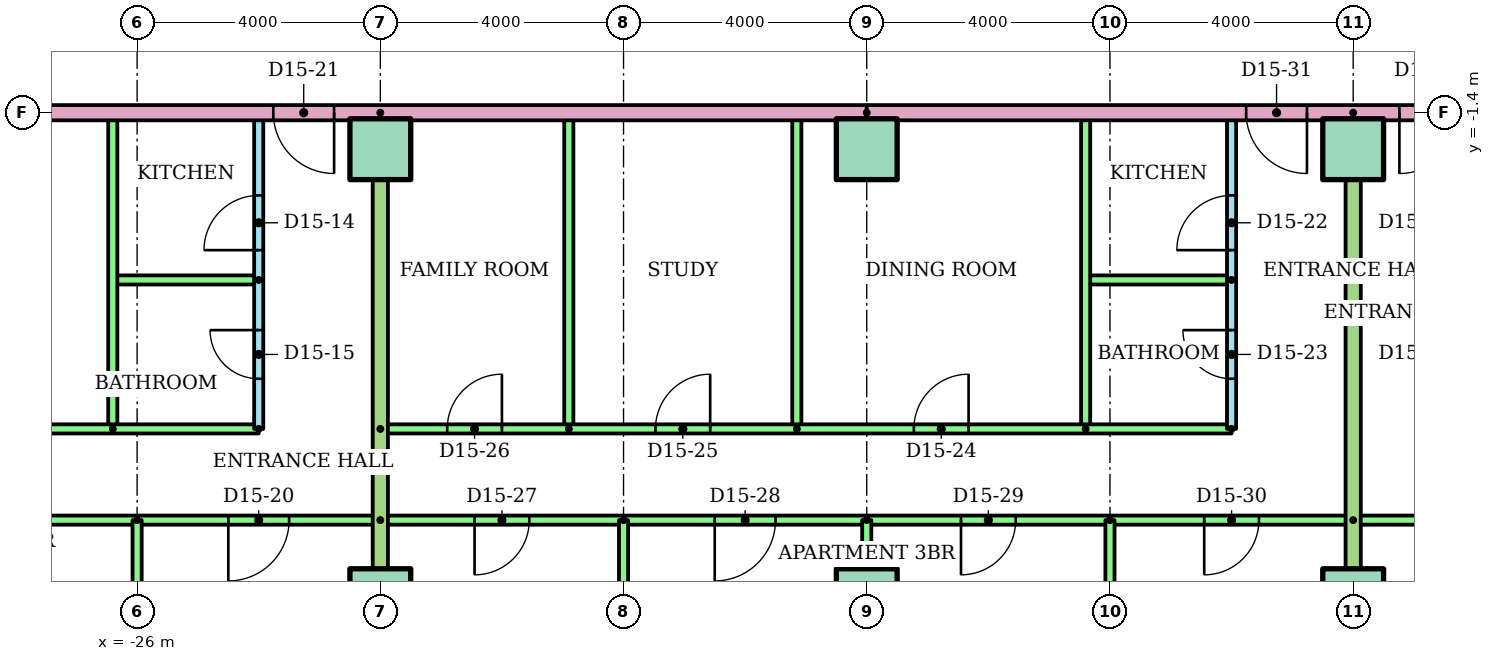
"""IFC4 building model, lengths in metres.
Left out: names, types, materials, properties, quantities, classifications, styles, units other than length and angle.
Written with IfcOpenShell. Run it as: python <this file> out.ifc"""

import sys

from ifc_helpers import new_model, si_unit, direction, frame, frame_2d, origin, origin_2d, place, context, subcontext, project, spatial, rectangle, extrude, element, fill, save


model = new_model("IFC4")
c1 = context("Model", 3, precision=1e-05, world=origin(), true_north=direction((0.0, 1.0)))
c2 = subcontext(c1, "Body", "Model", "MODEL_VIEW")
j1 = project(units=[si_unit("LENGTHUNIT", "METRE"), si_unit("PLANEANGLEUNIT", "RADIAN")], contexts=[c1])
p1 = place(None, origin())
s1 = spatial("IfcSite", under=j1, at=p1, CompositionType="ELEMENT")
p2 = place(p1, origin())
s2 = spatial("IfcBuilding", under=s1, at=p2, CompositionType="ELEMENT")
p3 = place(p2, frame((0.0, 0.0, 57.6)))
s3 = spatial("IfcBuildingStorey", under=s2, at=p3, CompositionType="ELEMENT", Elevation=57.6)
for number, where in (
    (1, (-22.0, -9.4, 0.0)),
    (2, (-14.0, -9.4, 0.0)),
    (3, (-6.0, -9.4, 0.0)),
    (4, (-22.0, -2.0, 0.0)),
    (5, (-14.0, -2.0, 0.0)),
    (6, (-6.0, -2.0, 0.0)),
):
    element("IfcColumn", number, at=place(p3, frame(where)), inside=s3, PredefinedType="COLUMN", context=c2, shape_type="SweptSolid", body=[
        extrude(rectangle(XDim=1.0, YDim=1.0, at=origin_2d()), origin(), (0.0, 0.0, 1.0), 3.2),
    ])
p4 = place(p3, frame((-24.0, -6.6, 0.0), z_axis=(0.0, 0.0, 1.0), x_axis=(0.0, 1.0, 0.0)))
e7 = element("IfcWall", 7, at=p4, inside=s3, PredefinedType="PARTITIONING", context=c2, shape_type="SweptSolid", body=[
    extrude(rectangle(XDim=5.2, YDim=0.15, at=frame_2d((2.6, 0.0))), origin(), (0.0, 0.0, 1.0), 2.4),
])
p5 = place(p4, frame((2.94, 0.0, 0.0)))
e8 = element("IfcOpeningElement", 8, at=p5, cuts=e7, PredefinedType="OPENING", context=c2, shape_type="SweptSolid", body=[
    extrude(rectangle(XDim=0.9, YDim=2.1, at=frame_2d((0.45, 1.05))), frame((0.0, 0.085, 0.0), z_axis=(0.0, -1.0, 0.0), x_axis=(1.0, 0.0, 0.0)), (0.0, 0.0, 1.0), 0.17),
])
p6 = place(p4, frame((0.825, 0.0, 0.0)))
e9 = element("IfcOpeningElement", 9, at=p6, cuts=e7, PredefinedType="OPENING", context=c2, shape_type="SweptSolid", body=[
    extrude(rectangle(XDim=0.8, YDim=2.1, at=frame_2d((0.4, 1.05))), frame((0.0, 0.085, 0.0), z_axis=(0.0, -1.0, 0.0), x_axis=(1.0, 0.0, 0.0)), (0.0, 0.0, 1.0), 0.17),
])
p7 = place(p3, frame((-24.0, -4.15, 0.0), z_axis=(0.0, 0.0, 1.0), x_axis=(-1.0, 0.0, 0.0)))
e10 = element("IfcWall", 10, at=p7, inside=s3, PredefinedType="PARTITIONING", context=c2, shape_type="SweptSolid", body=[
    extrude(rectangle(XDim=2.4, YDim=0.15, at=frame_2d((1.2, 0.0))), origin(), (0.0, 0.0, 1.0), 2.4),
])
p8 = place(p3, frame((-26.4, -6.6, 0.0), z_axis=(0.0, 0.0, 1.0), x_axis=(0.0, 1.0, 0.0)))
e11 = element("IfcWall", 11, at=p8, inside=s3, PredefinedType="PARTITIONING", context=c2, shape_type="SweptSolid", body=[
    extrude(rectangle(XDim=5.2, YDim=0.15, at=frame_2d((2.6, 0.0))), origin(), (0.0, 0.0, 1.0), 2.4),
])
p9 = place(p3, frame((-36.51, -6.6, 0.0)))
e12 = element("IfcWall", 12, at=p9, inside=s3, PredefinedType="PARTITIONING", context=c2, shape_type="SweptSolid", body=[
    extrude(rectangle(XDim=12.51, YDim=0.15, at=frame_2d((6.255, 0.0))), origin(), (0.0, 0.0, 1.0), 2.4),
])
p10 = place(p9, frame((6.785, 0.0, 0.0)))
e13 = element("IfcOpeningElement", 13, at=p10, cuts=e12, PredefinedType="OPENING", context=c2, shape_type="SweptSolid", body=[
    extrude(rectangle(XDim=0.9, YDim=2.1, at=frame_2d((0.45, 1.05))), frame((0.0, 0.085, 0.0), z_axis=(0.0, -1.0, 0.0), x_axis=(1.0, 0.0, 0.0)), (0.0, 0.0, 1.0), 0.17),
])
p11 = place(p9, frame((1.835, 0.0, 0.0)))
e14 = element("IfcOpeningElement", 14, at=p11, cuts=e12, PredefinedType="OPENING", context=c2, shape_type="SweptSolid", body=[
    extrude(rectangle(XDim=0.9, YDim=2.1, at=frame_2d((0.45, 1.05))), frame((0.0, 0.085, 0.0), z_axis=(0.0, -1.0, 0.0), x_axis=(1.0, 0.0, 0.0)), (0.0, 0.0, 1.0), 0.17),
])
p12 = place(p3, frame((-22.0, -8.1, 0.0), z_axis=(0.0, 0.0, 1.0), x_axis=(-1.0, 0.0, 0.0)))
e15 = element("IfcWall", 15, at=p12, inside=s3, PredefinedType="PARTITIONING", context=c2, shape_type="SweptSolid", body=[
    extrude(rectangle(XDim=14.51, YDim=0.15, at=frame_2d((7.255, 0.0))), origin(), (0.0, 0.0, 1.0), 2.4),
])
p13 = place(p12, frame((11.6, 0.0, 0.0)))
e16 = element("IfcOpeningElement", 16, at=p13, cuts=e15, PredefinedType="OPENING", context=c2, shape_type="SweptSolid", body=[
    extrude(rectangle(XDim=0.9, YDim=2.1, at=frame_2d((0.45, 1.05))), frame((0.0, 0.085, 0.0), z_axis=(0.0, -1.0, 0.0), x_axis=(1.0, 0.0, 0.0)), (0.0, 0.0, 1.0), 0.17),
])
p14 = place(p12, frame((6.34, 0.0, 0.0)))
e17 = element("IfcOpeningElement", 17, at=p14, cuts=e15, PredefinedType="OPENING", context=c2, shape_type="SweptSolid", body=[
    extrude(rectangle(XDim=0.9, YDim=2.1, at=frame_2d((0.45, 1.05))), frame((0.0, 0.085, 0.0), z_axis=(0.0, -1.0, 0.0), x_axis=(1.0, 0.0, 0.0)), (0.0, 0.0, 1.0), 0.17),
])
p15 = place(p12, frame((1.5, 0.0, 0.0)))
e18 = element("IfcOpeningElement", 18, at=p15, cuts=e15, PredefinedType="OPENING", context=c2, shape_type="SweptSolid", body=[
    extrude(rectangle(XDim=1.0, YDim=2.1, at=frame_2d((0.5, 1.05))), frame((0.0, 0.085, 0.0), z_axis=(0.0, -1.0, 0.0), x_axis=(1.0, 0.0, 0.0)), (0.0, 0.0, 1.0), 0.17),
])
p16 = place(p3, frame((-26.0, -8.1, 0.0), z_axis=(0.0, 0.0, 1.0), x_axis=(0.0, -1.0, 0.0)))
e19 = element("IfcWall", 19, at=p16, inside=s3, PredefinedType="PARTITIONING", context=c2, shape_type="SweptSolid", body=[
    extrude(rectangle(XDim=8.021, YDim=0.15, at=frame_2d((4.01, 0.0))), origin(), (0.0, 0.0, 1.0), 2.4),
])
p17 = place(p3, frame((-8.0, -6.6, 0.0), z_axis=(0.0, 0.0, 1.0), x_axis=(0.0, 1.0, 0.0)))
e20 = element("IfcWall", 20, at=p17, inside=s3, PredefinedType="PARTITIONING", context=c2, shape_type="SweptSolid", body=[
    extrude(rectangle(XDim=5.2, YDim=0.15, at=frame_2d((2.6, 0.0))), origin(), (0.0, 0.0, 1.0), 2.4),
])
p18 = place(p17, frame((2.94, 0.0, 0.0)))
e21 = element("IfcOpeningElement", 21, at=p18, cuts=e20, PredefinedType="OPENING", context=c2, shape_type="SweptSolid", body=[
    extrude(rectangle(XDim=0.9, YDim=2.1, at=frame_2d((0.45, 1.05))), frame((0.0, 0.085, 0.0), z_axis=(0.0, -1.0, 0.0), x_axis=(1.0, 0.0, 0.0)), (0.0, 0.0, 1.0), 0.17),
])
p19 = place(p17, frame((0.825, 0.0, 0.0)))
e22 = element("IfcOpeningElement", 22, at=p19, cuts=e20, PredefinedType="OPENING", context=c2, shape_type="SweptSolid", body=[
    extrude(rectangle(XDim=0.8, YDim=2.1, at=frame_2d((0.4, 1.05))), frame((0.0, 0.085, 0.0), z_axis=(0.0, -1.0, 0.0), x_axis=(1.0, 0.0, 0.0)), (0.0, 0.0, 1.0), 0.17),
])
p20 = place(p3, frame((-8.0, -4.15, 0.0), z_axis=(0.0, 0.0, 1.0), x_axis=(-1.0, 0.0, 0.0)))
e23 = element("IfcWall", 23, at=p20, inside=s3, PredefinedType="PARTITIONING", context=c2, shape_type="SweptSolid", body=[
    extrude(rectangle(XDim=2.4, YDim=0.15, at=frame_2d((1.2, 0.0))), origin(), (0.0, 0.0, 1.0), 2.4),
])
for number, where, z_axis, x_axis in (
    (24, (-10.4, -6.6, 0.0), (0.0, 0.0, 1.0), (0.0, 1.0, 0.0)),
    (25, (-15.15, -6.6, 0.0), (0.0, 0.0, 1.0), (0.0, 1.0, 0.0)),
    (26, (-18.9, -6.6, 0.0), (0.0, 0.0, 1.0), (0.0, 1.0, 0.0)),
):
    element("IfcWall", number, at=place(p3, frame(where, z_axis=z_axis, x_axis=x_axis)), inside=s3, PredefinedType="PARTITIONING", context=c2, shape_type="SweptSolid", body=[
        extrude(rectangle(XDim=5.2, YDim=0.15, at=frame_2d((2.6, 0.0))), origin(), (0.0, 0.0, 1.0), 2.4),
    ])
p21 = place(p3, frame((-22.0, -6.6, 0.0)))
e27 = element("IfcWall", 27, at=p21, inside=s3, PredefinedType="PARTITIONING", context=c2, shape_type="SweptSolid", body=[
    extrude(rectangle(XDim=14.0, YDim=0.15, at=frame_2d((7.0, 0.0))), origin(), (0.0, 0.0, 1.0), 2.4),
])
p22 = place(p21, frame((8.775, 0.0, 0.0)))
e28 = element("IfcOpeningElement", 28, at=p22, cuts=e27, PredefinedType="OPENING", context=c2, shape_type="SweptSolid", body=[
    extrude(rectangle(XDim=0.9, YDim=2.1, at=frame_2d((0.45, 1.05))), frame((0.0, 0.085, 0.0), z_axis=(0.0, -1.0, 0.0), x_axis=(1.0, 0.0, 0.0)), (0.0, 0.0, 1.0), 0.17),
])
p23 = place(p21, frame((4.525, 0.0, 0.0)))
e29 = element("IfcOpeningElement", 29, at=p23, cuts=e27, PredefinedType="OPENING", context=c2, shape_type="SweptSolid", body=[
    extrude(rectangle(XDim=0.9, YDim=2.1, at=frame_2d((0.45, 1.05))), frame((0.0, 0.085, 0.0), z_axis=(0.0, -1.0, 0.0), x_axis=(1.0, 0.0, 0.0)), (0.0, 0.0, 1.0), 0.17),
])
p24 = place(p21, frame((1.1, 0.0, 0.0)))
e30 = element("IfcOpeningElement", 30, at=p24, cuts=e27, PredefinedType="OPENING", context=c2, shape_type="SweptSolid", body=[
    extrude(rectangle(XDim=0.9, YDim=2.1, at=frame_2d((0.45, 1.05))), frame((0.0, 0.085, 0.0), z_axis=(0.0, -1.0, 0.0), x_axis=(1.0, 0.0, 0.0)), (0.0, 0.0, 1.0), 0.17),
])
p25 = place(p3, frame((-6.0, -8.1, 0.0), z_axis=(0.0, 0.0, 1.0), x_axis=(-1.0, 0.0, 0.0)))
e31 = element("IfcWall", 31, at=p25, inside=s3, PredefinedType="PARTITIONING", context=c2, shape_type="SweptSolid", body=[
    extrude(rectangle(XDim=16.0, YDim=0.15, at=frame_2d((8.0, 0.0))), origin(), (0.0, 0.0, 1.0), 2.4),
])
p26 = place(p25, frame((13.55, 0.0, 0.0)))
e32 = element("IfcOpeningElement", 32, at=p26, cuts=e31, PredefinedType="OPENING", context=c2, shape_type="SweptSolid", body=[
    extrude(rectangle(XDim=0.9, YDim=2.1, at=frame_2d((0.45, 1.05))), frame((0.0, 0.085, 0.0), z_axis=(0.0, -1.0, 0.0), x_axis=(1.0, 0.0, 0.0)), (0.0, 0.0, 1.0), 0.17),
])
p27 = place(p25, frame((9.5, 0.0, 0.0)))
e33 = element("IfcOpeningElement", 33, at=p27, cuts=e31, PredefinedType="OPENING", context=c2, shape_type="SweptSolid", body=[
    extrude(rectangle(XDim=1.0, YDim=2.1, at=frame_2d((0.5, 1.05))), frame((0.0, 0.085, 0.0), z_axis=(0.0, -1.0, 0.0), x_axis=(1.0, 0.0, 0.0)), (0.0, 0.0, 1.0), 0.17),
])
p28 = place(p25, frame((5.55, 0.0, 0.0)))
e34 = element("IfcOpeningElement", 34, at=p28, cuts=e31, PredefinedType="OPENING", context=c2, shape_type="SweptSolid", body=[
    extrude(rectangle(XDim=0.9, YDim=2.1, at=frame_2d((0.45, 1.05))), frame((0.0, 0.085, 0.0), z_axis=(0.0, -1.0, 0.0), x_axis=(1.0, 0.0, 0.0)), (0.0, 0.0, 1.0), 0.17),
])
p29 = place(p25, frame((1.55, 0.0, 0.0)))
e35 = element("IfcOpeningElement", 35, at=p29, cuts=e31, PredefinedType="OPENING", context=c2, shape_type="SweptSolid", body=[
    extrude(rectangle(XDim=0.9, YDim=2.1, at=frame_2d((0.45, 1.05))), frame((0.0, 0.085, 0.0), z_axis=(0.0, -1.0, 0.0), x_axis=(1.0, 0.0, 0.0)), (0.0, 0.0, 1.0), 0.17),
])
p30 = place(p3, frame((-18.0, -8.1, 0.0), z_axis=(0.0, 0.0, 1.0), x_axis=(0.0, -1.0, 0.0)))
e36 = element("IfcWall", 36, at=p30, inside=s3, PredefinedType="PARTITIONING", context=c2, shape_type="SweptSolid", body=[
    extrude(rectangle(XDim=8.021, YDim=0.15, at=frame_2d((4.01, 0.0))), origin(), (0.0, 0.0, 1.0), 2.4),
])
p31 = place(p3, frame((-14.0, -8.1, 0.0), z_axis=(0.0, 0.0, 1.0), x_axis=(0.0, -1.0, 0.0)))
e37 = element("IfcWall", 37, at=p31, inside=s3, PredefinedType="PARTITIONING", context=c2, shape_type="SweptSolid", body=[
    extrude(rectangle(XDim=8.01, YDim=0.15, at=frame_2d((4.005, 0.0))), origin(), (0.0, 0.0, 1.0), 2.4),
])
p32 = place(p3, frame((-10.0, -8.1, 0.0), z_axis=(0.0, 0.0, 1.0), x_axis=(0.0, -1.0, 0.0)))
e38 = element("IfcWall", 38, at=p32, inside=s3, PredefinedType="PARTITIONING", context=c2, shape_type="SweptSolid", body=[
    extrude(rectangle(XDim=8.021, YDim=0.15, at=frame_2d((4.01, 0.0))), origin(), (0.0, 0.0, 1.0), 2.4),
])
p33 = place(p3, frame((-22.0, -1.4, 0.0), z_axis=(0.0, 0.0, 1.0), x_axis=(0.0, -1.0, 0.0)))
e39 = element("IfcWall", 39, at=p33, inside=s3, PredefinedType="PARTITIONING", context=c2, shape_type="SweptSolid", body=[
    extrude(rectangle(XDim=14.71, YDim=0.25, at=frame_2d((7.355, 0.0))), origin(), (0.0, 0.0, 1.0), 2.4),
])
p34 = place(p3, frame((10.0, -8.1, 0.0), z_axis=(0.0, 0.0, 1.0), x_axis=(-1.0, 0.0, 0.0)))
e40 = element("IfcWall", 40, at=p34, inside=s3, PredefinedType="PARTITIONING", context=c2, shape_type="SweptSolid", body=[
    extrude(rectangle(XDim=16.0, YDim=0.15, at=frame_2d((8.0, 0.0))), origin(), (0.0, 0.0, 1.0), 2.4),
])
p35 = place(p34, frame((13.55, 0.0, 0.0)))
e41 = element("IfcOpeningElement", 41, at=p35, cuts=e40, PredefinedType="OPENING", context=c2, shape_type="SweptSolid", body=[
    extrude(rectangle(XDim=0.9, YDim=2.1, at=frame_2d((0.45, 1.05))), frame((0.0, 0.085, 0.0), z_axis=(0.0, -1.0, 0.0), x_axis=(1.0, 0.0, 0.0)), (0.0, 0.0, 1.0), 0.17),
])
p36 = place(p34, frame((9.5, 0.0, 0.0)))
e42 = element("IfcOpeningElement", 42, at=p36, cuts=e40, PredefinedType="OPENING", context=c2, shape_type="SweptSolid", body=[
    extrude(rectangle(XDim=1.0, YDim=2.1, at=frame_2d((0.5, 1.05))), frame((0.0, 0.085, 0.0), z_axis=(0.0, -1.0, 0.0), x_axis=(1.0, 0.0, 0.0)), (0.0, 0.0, 1.0), 0.17),
])
p37 = place(p34, frame((5.55, 0.0, 0.0)))
e43 = element("IfcOpeningElement", 43, at=p37, cuts=e40, PredefinedType="OPENING", context=c2, shape_type="SweptSolid", body=[
    extrude(rectangle(XDim=0.9, YDim=2.1, at=frame_2d((0.45, 1.05))), frame((0.0, 0.085, 0.0), z_axis=(0.0, -1.0, 0.0), x_axis=(1.0, 0.0, 0.0)), (0.0, 0.0, 1.0), 0.17),
])
p38 = place(p34, frame((1.55, 0.0, 0.0)))
e44 = element("IfcOpeningElement", 44, at=p38, cuts=e40, PredefinedType="OPENING", context=c2, shape_type="SweptSolid", body=[
    extrude(rectangle(XDim=0.9, YDim=2.1, at=frame_2d((0.45, 1.05))), frame((0.0, 0.085, 0.0), z_axis=(0.0, -1.0, 0.0), x_axis=(1.0, 0.0, 0.0)), (0.0, 0.0, 1.0), 0.17),
])
p39 = place(p3, frame((-6.0, -1.4, 0.0), z_axis=(0.0, 0.0, 1.0), x_axis=(0.0, -1.0, 0.0)))
e45 = element("IfcWall", 45, at=p39, inside=s3, PredefinedType="PARTITIONING", context=c2, shape_type="SweptSolid", body=[
    extrude(rectangle(XDim=14.71, YDim=0.25, at=frame_2d((7.355, 0.0))), origin(), (0.0, 0.0, 1.0), 2.4),
])
p40 = place(p3, frame((-14.0, -1.4, 0.0), z_axis=(0.0, 0.0, 1.0), x_axis=(-1.0, 0.0, 0.0)))
e46 = element("IfcWall", 46, at=p40, inside=s3, PredefinedType="PARTITIONING", context=c2, shape_type="SweptSolid", body=[
    extrude(rectangle(XDim=15.0, YDim=0.25, at=frame_2d((7.5, 0.0))), origin(), (0.0, 0.0, 1.0), 2.4),
])
p41 = place(p40, frame((8.76, 0.0, 0.0)))
e47 = element("IfcOpeningElement", 47, at=p41, cuts=e46, PredefinedType="OPENING", context=c2, shape_type="SweptSolid", body=[
    extrude(rectangle(XDim=1.0, YDim=2.1, at=frame_2d((0.5, 1.05))), frame((0.0, 0.135, 0.0), z_axis=(0.0, -1.0, 0.0), x_axis=(1.0, 0.0, 0.0)), (0.0, 0.0, 1.0), 0.27),
])
p42 = place(p3, frame((14.0, -1.4, 0.0), z_axis=(0.0, 0.0, 1.0), x_axis=(-1.0, 0.0, 0.0)))
e48 = element("IfcWall", 48, at=p42, inside=s3, PredefinedType="PARTITIONING", context=c2, shape_type="SweptSolid", body=[
    extrude(rectangle(XDim=28.0, YDim=0.25, at=frame_2d((14.0, 0.0))), origin(), (0.0, 0.0, 1.0), 2.4),
])
p43 = place(p42, frame((20.76, 0.0, 0.0)))
e49 = element("IfcOpeningElement", 49, at=p43, cuts=e48, PredefinedType="OPENING", context=c2, shape_type="SweptSolid", body=[
    extrude(rectangle(XDim=1.0, YDim=2.1, at=frame_2d((0.5, 1.05))), frame((0.0, 0.135, 0.0), z_axis=(0.0, -1.0, 0.0), x_axis=(1.0, 0.0, 0.0)), (0.0, 0.0, 1.0), 0.27),
])
p44 = place(p42, frame((18.24, 0.0, 0.0)))
e50 = element("IfcOpeningElement", 50, at=p44, cuts=e48, PredefinedType="OPENING", context=c2, shape_type="SweptSolid", body=[
    extrude(rectangle(XDim=1.0, YDim=2.1, at=frame_2d((0.5, 1.05))), frame((0.0, 0.135, 0.0), z_axis=(0.0, -1.0, 0.0), x_axis=(1.0, 0.0, 0.0)), (0.0, 0.0, 1.0), 0.27),
])
p45 = place(p42, frame((2.24, 0.0, 0.0)))
e51 = element("IfcOpeningElement", 51, at=p45, cuts=e48, PredefinedType="OPENING", context=c2, shape_type="SweptSolid", body=[
    extrude(rectangle(XDim=1.0, YDim=2.1, at=frame_2d((0.5, 1.05))), frame((0.0, 0.135, 0.0), z_axis=(0.0, -1.0, 0.0), x_axis=(1.0, 0.0, 0.0)), (0.0, 0.0, 1.0), 0.27),
])
p46 = place(p5, origin())
e52 = element("IfcDoor", 52, at=p46, inside=s3, OperationType="SINGLE_SWING_LEFT", PredefinedType="DOOR", context=c2, shape_type="SweptSolid", body=[
    extrude(rectangle(XDim=0.9, YDim=2.1, at=frame_2d((0.45, 1.05))), frame((0.0, 0.025, 0.0), z_axis=(0.0, -1.0, 0.0), x_axis=(1.0, 0.0, 0.0)), (0.0, 0.0, 1.0), 0.05),
])
fill(e8, e52)
p47 = place(p6, origin())
e53 = element("IfcDoor", 53, at=p47, inside=s3, OperationType="SINGLE_SWING_RIGHT", PredefinedType="DOOR", context=c2, shape_type="SweptSolid", body=[
    extrude(rectangle(XDim=0.8, YDim=2.1, at=frame_2d((0.4, 1.05))), frame((0.0, 0.025, 0.0), z_axis=(0.0, -1.0, 0.0), x_axis=(1.0, 0.0, 0.0)), (0.0, 0.0, 1.0), 0.05),
])
fill(e9, e53)
p48 = place(p15, origin())
e54 = element("IfcDoor", 54, at=p48, inside=s3, OperationType="SINGLE_SWING_RIGHT", PredefinedType="DOOR", context=c2, shape_type="SweptSolid", body=[
    extrude(rectangle(XDim=1.0, YDim=2.1, at=frame_2d((0.5, 1.05))), frame((0.0, 0.025, 0.0), z_axis=(0.0, -1.0, 0.0), x_axis=(1.0, 0.0, 0.0)), (0.0, 0.0, 1.0), 0.05),
])
fill(e18, e54)
p49 = place(p41, origin())
e55 = element("IfcDoor", 55, at=p49, inside=s3, OperationType="SINGLE_SWING_LEFT", PredefinedType="DOOR", context=c2, shape_type="SweptSolid", body=[
    extrude(rectangle(XDim=1.0, YDim=2.1, at=frame_2d((0.5, 1.05))), frame((0.0, 0.025, 0.0), z_axis=(0.0, -1.0, 0.0), x_axis=(1.0, 0.0, 0.0)), (0.0, 0.0, 1.0), 0.05),
])
fill(e47, e55)
p50 = place(p18, origin())
e56 = element("IfcDoor", 56, at=p50, inside=s3, OperationType="SINGLE_SWING_LEFT", PredefinedType="DOOR", context=c2, shape_type="SweptSolid", body=[
    extrude(rectangle(XDim=0.9, YDim=2.1, at=frame_2d((0.45, 1.05))), frame((0.0, 0.025, 0.0), z_axis=(0.0, -1.0, 0.0), x_axis=(1.0, 0.0, 0.0)), (0.0, 0.0, 1.0), 0.05),
])
fill(e21, e56)
p51 = place(p19, origin())
e57 = element("IfcDoor", 57, at=p51, inside=s3, OperationType="SINGLE_SWING_RIGHT", PredefinedType="DOOR", context=c2, shape_type="SweptSolid", body=[
    extrude(rectangle(XDim=0.8, YDim=2.1, at=frame_2d((0.4, 1.05))), frame((0.0, 0.025, 0.0), z_axis=(0.0, -1.0, 0.0), x_axis=(1.0, 0.0, 0.0)), (0.0, 0.0, 1.0), 0.05),
])
fill(e22, e57)
p52 = place(p22, origin())
e58 = element("IfcDoor", 58, at=p52, inside=s3, OperationType="SINGLE_SWING_RIGHT", PredefinedType="DOOR", context=c2, shape_type="SweptSolid", body=[
    extrude(rectangle(XDim=0.9, YDim=2.1, at=frame_2d((0.45, 1.05))), frame((0.0, 0.025, 0.0), z_axis=(0.0, -1.0, 0.0), x_axis=(1.0, 0.0, 0.0)), (0.0, 0.0, 1.0), 0.05),
])
fill(e28, e58)
p53 = place(p23, origin())
e59 = element("IfcDoor", 59, at=p53, inside=s3, OperationType="SINGLE_SWING_RIGHT", PredefinedType="DOOR", context=c2, shape_type="SweptSolid", body=[
    extrude(rectangle(XDim=0.9, YDim=2.1, at=frame_2d((0.45, 1.05))), frame((0.0, 0.025, 0.0), z_axis=(0.0, -1.0, 0.0), x_axis=(1.0, 0.0, 0.0)), (0.0, 0.0, 1.0), 0.05),
])
fill(e29, e59)
p54 = place(p24, origin())
e60 = element("IfcDoor", 60, at=p54, inside=s3, OperationType="SINGLE_SWING_RIGHT", PredefinedType="DOOR", context=c2, shape_type="SweptSolid", body=[
    extrude(rectangle(XDim=0.9, YDim=2.1, at=frame_2d((0.45, 1.05))), frame((0.0, 0.025, 0.0), z_axis=(0.0, -1.0, 0.0), x_axis=(1.0, 0.0, 0.0)), (0.0, 0.0, 1.0), 0.05),
])
fill(e30, e60)
p55 = place(p26, origin())
e61 = element("IfcDoor", 61, at=p55, inside=s3, OperationType="SINGLE_SWING_RIGHT", PredefinedType="DOOR", context=c2, shape_type="SweptSolid", body=[
    extrude(rectangle(XDim=0.9, YDim=2.1, at=frame_2d((0.45, 1.05))), frame((0.0, 0.025, 0.0), z_axis=(0.0, -1.0, 0.0), x_axis=(1.0, 0.0, 0.0)), (0.0, 0.0, 1.0), 0.05),
])
fill(e32, e61)
p56 = place(p27, origin())
e62 = element("IfcDoor", 62, at=p56, inside=s3, OperationType="SINGLE_SWING_RIGHT", PredefinedType="DOOR", context=c2, shape_type="SweptSolid", body=[
    extrude(rectangle(XDim=1.0, YDim=2.1, at=frame_2d((0.5, 1.05))), frame((0.0, 0.025, 0.0), z_axis=(0.0, -1.0, 0.0), x_axis=(1.0, 0.0, 0.0)), (0.0, 0.0, 1.0), 0.05),
])
fill(e33, e62)
p57 = place(p28, origin())
e63 = element("IfcDoor", 63, at=p57, inside=s3, OperationType="SINGLE_SWING_RIGHT", PredefinedType="DOOR", context=c2, shape_type="SweptSolid", body=[
    extrude(rectangle(XDim=0.9, YDim=2.1, at=frame_2d((0.45, 1.05))), frame((0.0, 0.025, 0.0), z_axis=(0.0, -1.0, 0.0), x_axis=(1.0, 0.0, 0.0)), (0.0, 0.0, 1.0), 0.05),
])
fill(e34, e63)
p58 = place(p29, origin())
e64 = element("IfcDoor", 64, at=p58, inside=s3, OperationType="SINGLE_SWING_RIGHT", PredefinedType="DOOR", context=c2, shape_type="SweptSolid", body=[
    extrude(rectangle(XDim=0.9, YDim=2.1, at=frame_2d((0.45, 1.05))), frame((0.0, 0.025, 0.0), z_axis=(0.0, -1.0, 0.0), x_axis=(1.0, 0.0, 0.0)), (0.0, 0.0, 1.0), 0.05),
])
fill(e35, e64)
p59 = place(p43, origin())
e65 = element("IfcDoor", 65, at=p59, inside=s3, OperationType="SINGLE_SWING_LEFT", PredefinedType="DOOR", context=c2, shape_type="SweptSolid", body=[
    extrude(rectangle(XDim=1.0, YDim=2.1, at=frame_2d((0.5, 1.05))), frame((0.0, 0.025, 0.0), z_axis=(0.0, -1.0, 0.0), x_axis=(1.0, 0.0, 0.0)), (0.0, 0.0, 1.0), 0.05),
])
fill(e49, e65)
p60 = place(p44, origin())
e66 = element("IfcDoor", 66, at=p60, inside=s3, OperationType="SINGLE_SWING_RIGHT", PredefinedType="DOOR", context=c2, shape_type="SweptSolid", body=[
    extrude(rectangle(XDim=1.0, YDim=2.1, at=frame_2d((0.5, 1.05))), frame((0.0, 0.025, 0.0), z_axis=(0.0, -1.0, 0.0), x_axis=(1.0, 0.0, 0.0)), (0.0, 0.0, 1.0), 0.05),
])
fill(e50, e66)
save(model, sys.argv[1])
